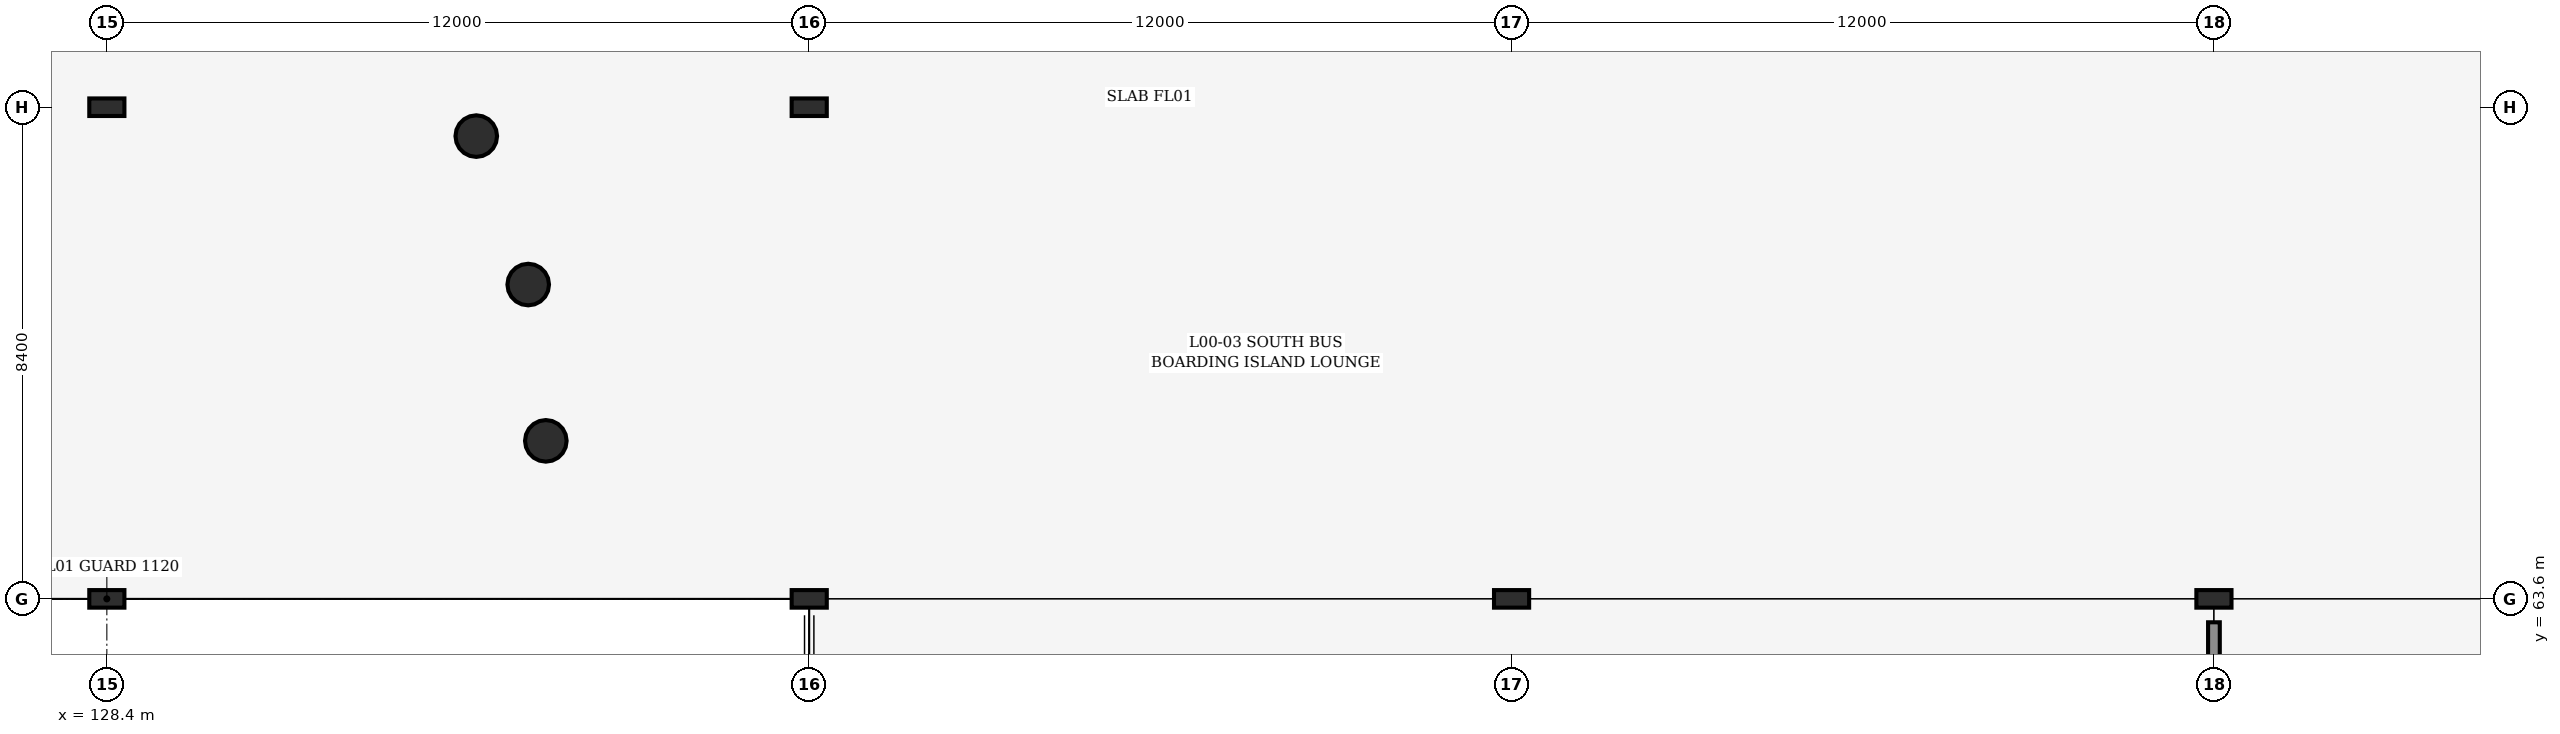
"""IFC4 building model, lengths in metres.
Left out: names, types, materials, properties, quantities, classifications, styles, units other than length and angle.
Written with IfcOpenShell. Run it as: python <this file> out.ifc"""

import sys

from ifc_helpers import new_model, si_unit, direction, frame, frame_2d, origin, origin_2d, place, context, subcontext, project, spatial, rectangle, hollow_circle, i_section, extrude, element, save


model = new_model("IFC4")
c1 = context("Model", 3, precision=1e-05, world=origin(), true_north=direction((0.0, 1.0)))
c2 = subcontext(c1, "Body", "Model", "MODEL_VIEW")
j1 = project(units=[si_unit("LENGTHUNIT", "METRE"), si_unit("PLANEANGLEUNIT", "RADIAN")], contexts=[c1])
p1 = place(None, origin())
s1 = spatial("IfcSite", under=j1, at=p1, CompositionType="ELEMENT")
p2 = place(p1, origin())
s2 = spatial("IfcBuilding", under=s1, at=p2, CompositionType="ELEMENT")
p3 = place(p2, origin())
s3 = spatial("IfcBuildingStorey", under=s2, at=p3, CompositionType="ELEMENT", Elevation=0.0)
for number, where, z_axis, x_axis in (
    (1, (128.4, 63.6, 0.0), (0.0, 0.0, 1.0), (1.0, 0.0, 0.0)),
    (2, (128.4, 72.0, 0.0), (0.0, 0.0, 1.0), (1.0, 0.0, 0.0)),
):
    element("IfcColumn", number, at=place(p3, frame(where, z_axis=z_axis, x_axis=x_axis)), inside=s3, PredefinedType="COLUMN", context=c2, shape_type="SweptSolid", body=[
        extrude(i_section(OverallWidth=0.3, OverallDepth=0.6, WebThickness=0.015, FlangeThickness=0.03, FilletRadius=0.027, at=origin_2d()), origin(), (0.0, 0.0, 1.0), 5.4),
    ])
for number, where, z_axis, x_axis in (
    (3, (134.712, 71.507, 0.0), (0.0, 0.0, 1.0), (1.0, 0.0, 0.0)),
    (4, (135.599, 68.97, 0.0), (0.0, 0.0, 1.0), (1.0, 0.0, 0.0)),
    (5, (135.9, 66.3, 0.0), (0.0, 0.0, 1.0), (1.0, 0.0, 0.0)),
):
    element("IfcColumn", number, at=place(p3, frame(where, z_axis=z_axis, x_axis=x_axis)), inside=s3, PredefinedType="COLUMN", context=c2, shape_type="SweptSolid", body=[
        extrude(hollow_circle(Radius=0.355, WallThickness=0.025, at=origin_2d()), origin(), (0.0, 0.0, 1.0), 5.4),
    ])
for number, where, z_axis, x_axis in (
    (6, (140.4, 63.6, 0.0), (0.0, 0.0, 1.0), (1.0, 0.0, 0.0)),
    (7, (140.4, 72.0, 0.0), (0.0, 0.0, 1.0), (1.0, 0.0, 0.0)),
    (8, (152.4, 63.6, 0.0), (0.0, 0.0, 1.0), (1.0, 0.0, 0.0)),
    (9, (164.4, 63.6, 0.0), (0.0, 0.0, 1.0), (1.0, 0.0, 0.0)),
):
    element("IfcColumn", number, at=place(p3, frame(where, z_axis=z_axis, x_axis=x_axis)), inside=s3, PredefinedType="COLUMN", context=c2, shape_type="SweptSolid", body=[
        extrude(i_section(OverallWidth=0.3, OverallDepth=0.6, WebThickness=0.015, FlangeThickness=0.03, FilletRadius=0.027, at=origin_2d()), origin(), (0.0, 0.0, 1.0), 5.4),
    ])
p4 = place(p3, frame((164.4, 22.0, 0.0), z_axis=(0.0, 0.0, 1.0), x_axis=(0.0, 1.0, 0.0)))
e10 = element("IfcWall", 10, at=p4, inside=s3, PredefinedType="PARTITIONING", context=c2, shape_type="SweptSolid", body=[
    extrude(rectangle(XDim=41.2, YDim=0.2, at=frame_2d((20.6, 0.0))), origin(), (0.0, 0.0, 1.0), 4.325),
])
p5 = place(p4, frame((6.0, 0.0, 0.0)))
e11 = element("IfcOpeningElement", 11, at=p5, cuts=e10, PredefinedType="OPENING", context=c2, shape_type="SweptSolid", body=[
    extrude(rectangle(XDim=1.6, YDim=2.25, at=frame_2d((0.8, 1.125))), frame((0.0, 0.11, 0.0), z_axis=(0.0, -1.0, 0.0), x_axis=(1.0, 0.0, 0.0)), (0.0, 0.0, 1.0), 0.22),
])
save(model, sys.argv[1])
